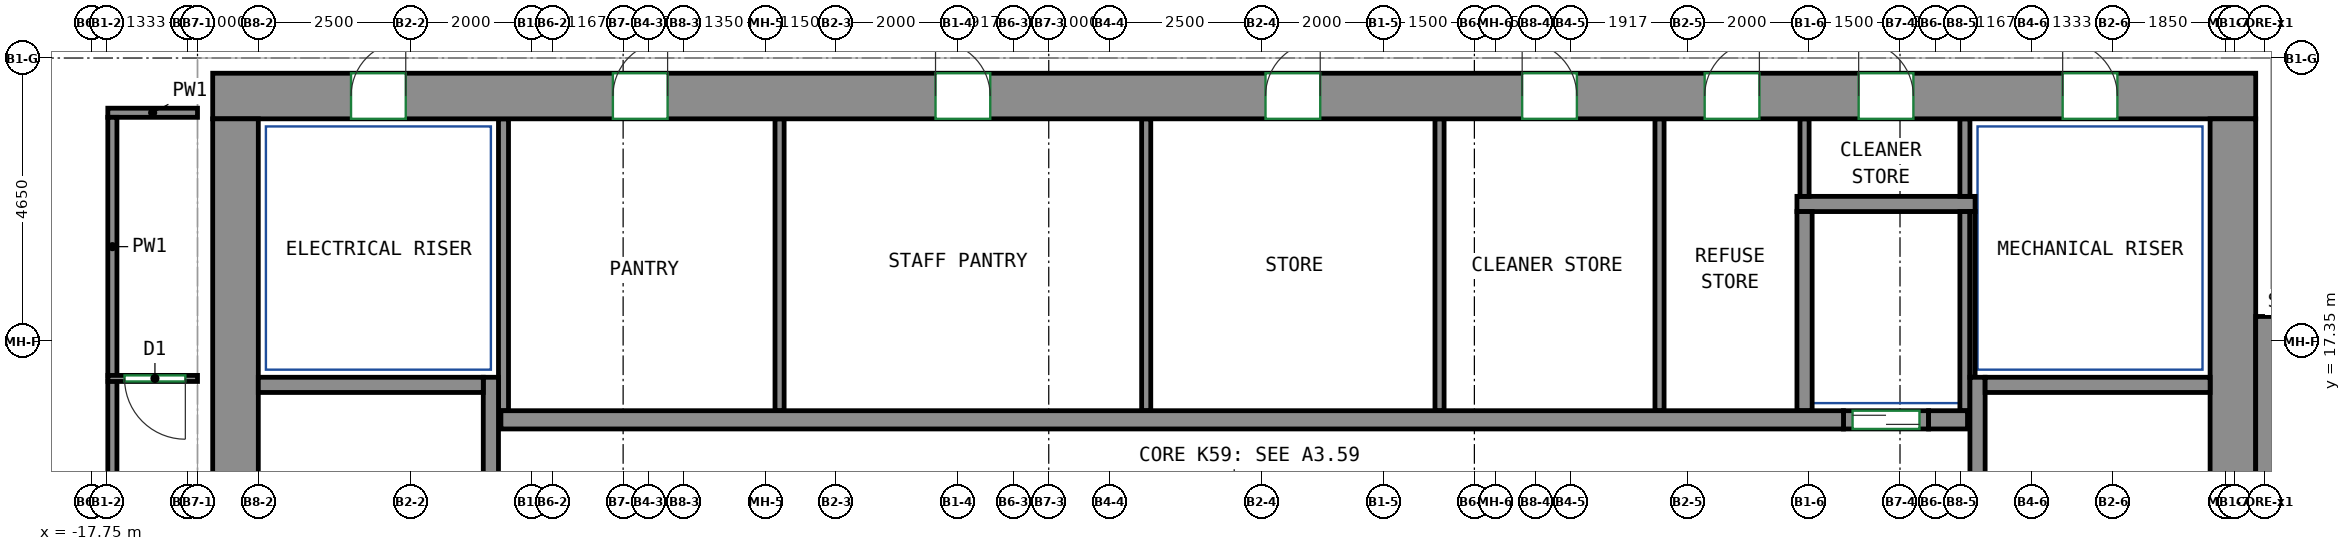
"""IFC4 building model, lengths in metres.
Left out: names, types, materials, properties, quantities, classifications, styles, units other than length and angle.
Written with IfcOpenShell. Run it as: python <this file> out.ifc"""

import sys

from ifc_helpers import new_model, si_unit, direction, frame, frame_2d, origin, place, context, subcontext, project, spatial, rectangle, extrude, source, transform, mapped, element, fill, save


model = new_model("IFC4")
c1 = context("Model", 3, precision=1e-05, world=origin(), true_north=direction((0.0, 1.0)))
c2 = subcontext(c1, "Body", "Model", "MODEL_VIEW")
j1 = project(units=[si_unit("LENGTHUNIT", "METRE"), si_unit("PLANEANGLEUNIT", "RADIAN")], contexts=[c1])
p1 = place(None, origin())
s1 = spatial("IfcSite", under=j1, at=p1, CompositionType="ELEMENT")
p2 = place(p1, origin())
s2 = spatial("IfcBuilding", under=s1, at=p2, CompositionType="ELEMENT")
p3 = place(p2, frame((0.0, 0.0, 242.4)))
s3 = spatial("IfcBuildingStorey", under=s2, at=p3, CompositionType="ELEMENT", Elevation=242.4)
m1 = source(origin(), c2, "Body", "SweptSolid", [
    extrude(rectangle(XDim=33.6, YDim=0.75, at=frame_2d((16.8, 0.0))), origin(), (0.0, 0.0, 1.0), 3.12),
])
p4 = place(p3, frame((-15.75, 21.375, 0.0), z_axis=(0.0, 0.0, 1.0), x_axis=(1.0, 0.0, 0.0)))
e1 = element("IfcWall", 1, at=p4, inside=s3, PredefinedType="SHEAR", context=c2, shape_type="MappedRepresentation", body=[
    mapped(m1, transform((0.0, 0.0, 0.0))),
])
p5 = place(p4, frame((6.581, 0.0, 0.0)))
e2 = element("IfcOpeningElement", 2, at=p5, cuts=e1, PredefinedType="OPENING", context=c2, shape_type="SweptSolid", body=[
    extrude(rectangle(XDim=0.9, YDim=2.1, at=frame_2d((0.45, 1.05))), frame((0.0, 0.385, 0.0), z_axis=(0.0, -1.0, 0.0), x_axis=(1.0, 0.0, 0.0)), (0.0, 0.0, 1.0), 0.77),
])
p6 = place(p4, frame((11.888, 0.0, 0.0)))
e3 = element("IfcOpeningElement", 3, at=p6, cuts=e1, PredefinedType="OPENING", context=c2, shape_type="SweptSolid", body=[
    extrude(rectangle(XDim=0.9, YDim=2.1, at=frame_2d((0.45, 1.05))), frame((0.0, 0.385, 0.0), z_axis=(0.0, -1.0, 0.0), x_axis=(1.0, 0.0, 0.0)), (0.0, 0.0, 1.0), 0.77),
])
p7 = place(p4, frame((17.315, 0.0, 0.0)))
e4 = element("IfcOpeningElement", 4, at=p7, cuts=e1, PredefinedType="OPENING", context=c2, shape_type="SweptSolid", body=[
    extrude(rectangle(XDim=0.9, YDim=2.1, at=frame_2d((0.45, 1.05))), frame((0.0, 0.385, 0.0), z_axis=(0.0, -1.0, 0.0), x_axis=(1.0, 0.0, 0.0)), (0.0, 0.0, 1.0), 0.77),
])
p8 = place(p4, frame((21.536, 0.0, 0.0)))
e5 = element("IfcOpeningElement", 5, at=p8, cuts=e1, PredefinedType="OPENING", context=c2, shape_type="SweptSolid", body=[
    extrude(rectangle(XDim=0.9, YDim=2.1, at=frame_2d((0.45, 1.05))), frame((0.0, 0.385, 0.0), z_axis=(0.0, -1.0, 0.0), x_axis=(1.0, 0.0, 0.0)), (0.0, 0.0, 1.0), 0.77),
])
p9 = place(p4, frame((24.537, 0.0, 0.0)))
e6 = element("IfcOpeningElement", 6, at=p9, cuts=e1, PredefinedType="OPENING", context=c2, shape_type="SweptSolid", body=[
    extrude(rectangle(XDim=0.9, YDim=2.1, at=frame_2d((0.45, 1.05))), frame((0.0, 0.385, 0.0), z_axis=(0.0, -1.0, 0.0), x_axis=(1.0, 0.0, 0.0)), (0.0, 0.0, 1.0), 0.77),
])
p10 = place(p4, frame((27.07, 0.0, 0.0)))
e7 = element("IfcOpeningElement", 7, at=p10, cuts=e1, PredefinedType="OPENING", context=c2, shape_type="SweptSolid", body=[
    extrude(rectangle(XDim=0.9, YDim=2.1, at=frame_2d((0.45, 1.05))), frame((0.0, 0.385, 0.0), z_axis=(0.0, -1.0, 0.0), x_axis=(1.0, 0.0, 0.0)), (0.0, 0.0, 1.0), 0.77),
])
p11 = place(p4, frame((2.275, 0.0, 0.0)))
e8 = element("IfcOpeningElement", 8, at=p11, cuts=e1, PredefinedType="OPENING", context=c2, shape_type="SweptSolid", body=[
    extrude(rectangle(XDim=0.9, YDim=2.1, at=frame_2d((0.45, 1.05))), frame((0.0, 0.385, 0.0), z_axis=(0.0, -1.0, 0.0), x_axis=(1.0, 0.0, 0.0)), (0.0, 0.0, 1.0), 0.77),
])
p12 = place(p4, frame((30.425, 0.0, 0.0)))
e9 = element("IfcOpeningElement", 9, at=p12, cuts=e1, PredefinedType="OPENING", context=c2, shape_type="SweptSolid", body=[
    extrude(rectangle(XDim=0.9, YDim=2.1, at=frame_2d((0.45, 1.05))), frame((0.0, 0.385, 0.0), z_axis=(0.0, -1.0, 0.0), x_axis=(1.0, 0.0, 0.0)), (0.0, 0.0, 1.0), 0.77),
])
m2 = source(origin(), c2, "Body", "SweptSolid", [
    extrude(rectangle(XDim=12.0, YDim=0.75, at=frame_2d((6.0, 0.0))), origin(), (0.0, 0.0, 1.0), 3.12),
])
for number, where, z_axis, x_axis in (
    (10, (-15.375, 9.0, 0.0), (0.0, 0.0, 1.0), (0.0, 1.0, 0.0)),
    (11, (17.475, 9.0, 0.0), (0.0, 0.0, 1.0), (0.0, 1.0, 0.0)),
):
    element("IfcWall", number, at=place(p3, frame(where, z_axis=z_axis, x_axis=x_axis)), inside=s3, PredefinedType="SHEAR", context=c2, shape_type="MappedRepresentation", body=[
        mapped(m2, transform((0.0, 0.0, 0.0))),
    ])
m3 = source(origin(), c2, "Body", "SweptSolid", [
    extrude(rectangle(XDim=7.75, YDim=0.25, at=frame_2d((3.875, 0.0))), origin(), (0.0, 0.0, 1.0), 3.12),
])
p13 = place(p3, frame((-11.175, 9.0, 0.0), z_axis=(0.0, 0.0, 1.0), x_axis=(0.0, 1.0, 0.0)))
e12 = element("IfcWall", 12, at=p13, inside=s3, PredefinedType="SHEAR", context=c2, shape_type="MappedRepresentation", body=[
    mapped(m3, transform((0.0, 0.0, 0.0))),
])
m4 = source(origin(), c2, "Body", "SweptSolid", [
    extrude(rectangle(XDim=3.7, YDim=0.25, at=frame_2d((1.85, 0.0))), origin(), (0.0, 0.0, 1.0), 3.12),
])
p14 = place(p3, frame((-15.0, 16.625, 0.0), z_axis=(0.0, 0.0, 1.0), x_axis=(1.0, 0.0, 0.0)))
e13 = element("IfcWall", 13, at=p14, inside=s3, PredefinedType="SHEAR", context=c2, shape_type="MappedRepresentation", body=[
    mapped(m4, transform((0.0, 0.0, 0.0))),
])
p15 = place(p3, frame((13.275, 9.0, 0.0), z_axis=(0.0, 0.0, 1.0), x_axis=(0.0, 1.0, 0.0)))
e14 = element("IfcWall", 14, at=p15, inside=s3, PredefinedType="SHEAR", context=c2, shape_type="MappedRepresentation", body=[
    mapped(m3, transform((0.0, 0.0, 0.0))),
])
m5 = source(origin(), c2, "Body", "SweptSolid", [
    extrude(rectangle(XDim=3.7, YDim=0.25, at=frame_2d((1.85, 0.0))), origin(), (0.0, 0.0, 1.0), 3.12),
])
p16 = place(p3, frame((13.4, 16.625, 0.0), z_axis=(0.0, 0.0, 1.0), x_axis=(1.0, 0.0, 0.0)))
e15 = element("IfcWall", 15, at=p16, inside=s3, PredefinedType="SHEAR", context=c2, shape_type="MappedRepresentation", body=[
    mapped(m5, transform((0.0, 0.0, 0.0))),
])
m6 = source(origin(), c2, "Body", "SweptSolid", [
    extrude(rectangle(XDim=8.0, YDim=0.5, at=frame_2d((4.0, 0.0))), origin(), (0.0, 0.0, 1.0), 3.12),
])
p17 = place(p3, frame((18.1, 9.75, 0.0), z_axis=(0.0, 0.0, 1.0), x_axis=(0.0, 1.0, 0.0)))
e16 = element("IfcWall", 16, at=p17, inside=s3, PredefinedType="SHEAR", context=c2, shape_type="MappedRepresentation", body=[
    mapped(m6, transform((0.0, 0.0, 0.0))),
])
m7 = source(origin(), c2, "Body", "SweptSolid", [
    extrude(rectangle(XDim=22.08, YDim=0.3, at=frame_2d((11.04, 0.0))), origin(), (0.0, 0.0, 1.0), 3.12),
])
p18 = place(p3, frame((-11.01, 16.05, 0.0), z_axis=(0.0, 0.0, 1.0), x_axis=(1.0, 0.0, 0.0)))
e17 = element("IfcWall", 17, at=p18, inside=s3, PredefinedType="SHEAR", context=c2, shape_type="MappedRepresentation", body=[
    mapped(m7, transform((0.0, 0.0, 0.0))),
])
m8 = source(origin(), c2, "Body", "SweptSolid", [
    extrude(rectangle(XDim=0.64, YDim=0.3, at=frame_2d((0.32, 0.0))), origin(), (0.0, 0.0, 1.0), 3.12),
])
p19 = place(p3, frame((12.47, 16.05, 0.0), z_axis=(0.0, 0.0, 1.0), x_axis=(1.0, 0.0, 0.0)))
e18 = element("IfcWall", 18, at=p19, inside=s3, PredefinedType="SHEAR", context=c2, shape_type="MappedRepresentation", body=[
    mapped(m8, transform((0.0, 0.0, 0.0))),
])
m9 = source(origin(), c2, "Body", "SweptSolid", [
    extrude(rectangle(XDim=1.4, YDim=0.3, at=frame_2d((0.7, 0.0))), origin(), (0.0, 0.0, 1.0), 3.12),
])
p20 = place(p3, frame((11.07, 16.05, 0.0), z_axis=(0.0, 0.0, 1.0), x_axis=(1.0, 0.0, 0.0)))
e19 = element("IfcWall", 19, at=p20, inside=s3, PredefinedType="PARTITIONING", context=c2, shape_type="MappedRepresentation", body=[
    mapped(m9, transform((0.0, 0.0, 0.0))),
])
p21 = place(p20, frame((0.15, 0.0, 0.0)))
e20 = element("IfcOpeningElement", 20, at=p21, cuts=e19, PredefinedType="OPENING", context=c2, shape_type="SweptSolid", body=[
    extrude(rectangle(XDim=1.1, YDim=2.1, at=frame_2d((0.55, 1.05))), frame((0.0, 0.16, 0.0), z_axis=(0.0, -1.0, 0.0), x_axis=(1.0, 0.0, 0.0)), (0.0, 0.0, 1.0), 0.32),
])
m10 = source(origin(), c2, "Body", "SweptSolid", [
    extrude(rectangle(XDim=2.93, YDim=0.25, at=frame_2d((1.465, 0.0))), origin(), (0.0, 0.0, 1.0), 3.12),
])
p22 = place(p3, frame((10.305, 19.6, 0.0), z_axis=(0.0, 0.0, 1.0), x_axis=(1.0, 0.0, 0.0)))
e21 = element("IfcWall", 21, at=p22, inside=s3, PredefinedType="PARTITIONING", context=c2, shape_type="MappedRepresentation", body=[
    mapped(m10, transform((0.0, 0.0, 0.0))),
])
m11 = source(origin(), c2, "Body", "SweptSolid", [
    extrude(rectangle(XDim=3.275, YDim=0.165, at=frame_2d((1.638, 0.0))), origin(), (0.0, 0.0, 1.0), 3.12),
])
p23 = place(p3, frame((13.067, 16.2, 0.0), z_axis=(0.0, 0.0, 1.0), x_axis=(0.0, 1.0, 0.0)))
e22 = element("IfcWall", 22, at=p23, inside=s3, PredefinedType="PARTITIONING", context=c2, shape_type="MappedRepresentation", body=[
    mapped(m11, transform((0.0, 0.0, 0.0))),
])
m12 = source(origin(), c2, "Body", "SweptSolid", [
    extrude(rectangle(XDim=1.275, YDim=0.165, at=frame_2d((0.637, 0.0))), origin(), (0.0, 0.0, 1.0), 3.12),
])
p24 = place(p3, frame((13.067, 19.725, 0.0), z_axis=(0.0, 0.0, 1.0), x_axis=(0.0, 1.0, 0.0)))
e23 = element("IfcWall", 23, at=p24, inside=s3, PredefinedType="PARTITIONING", context=c2, shape_type="MappedRepresentation", body=[
    mapped(m12, transform((0.0, 0.0, 0.0))),
])
m13 = source(origin(), c2, "Body", "SweptSolid", [
    extrude(rectangle(XDim=4.8, YDim=0.165, at=frame_2d((2.4, 0.0))), origin(), (0.0, 0.0, 1.0), 3.12),
])
p25 = place(p3, frame((-10.968, 16.2, 0.0), z_axis=(0.0, 0.0, 1.0), x_axis=(0.0, 1.0, 0.0)))
e24 = element("IfcWall", 24, at=p25, inside=s3, PredefinedType="PARTITIONING", context=c2, shape_type="MappedRepresentation", body=[
    mapped(m13, transform((0.0, 0.0, 0.0))),
])
m14 = source(origin(), c2, "Body", "SweptSolid", [
    extrude(rectangle(XDim=3.275, YDim=0.25, at=frame_2d((1.638, 0.0))), origin(), (0.0, 0.0, 1.0), 3.12),
])
p26 = place(p3, frame((10.43, 16.2, 0.0), z_axis=(0.0, 0.0, 1.0), x_axis=(0.0, 1.0, 0.0)))
e25 = element("IfcWall", 25, at=p26, inside=s3, PredefinedType="PARTITIONING", context=c2, shape_type="MappedRepresentation", body=[
    mapped(m14, transform((0.0, 0.0, 0.0))),
])
m15 = source(origin(), c2, "Body", "SweptSolid", [
    extrude(rectangle(XDim=2.725, YDim=0.085, at=frame_2d((1.363, 0.0))), origin(), (0.0, 0.0, 1.0), 3.12),
])
p27 = place(p3, frame((13.192, 16.75, 0.0), z_axis=(0.0, 0.0, 1.0), x_axis=(0.0, 1.0, 0.0)))
e26 = element("IfcWall", 26, at=p27, inside=s3, PredefinedType="PARTITIONING", context=c2, shape_type="MappedRepresentation", body=[
    mapped(m15, transform((0.0, 0.0, 0.0))),
])
m16 = source(origin(), c2, "Body", "SweptSolid", [
    extrude(rectangle(XDim=4.8, YDim=0.15, at=frame_2d((2.4, 0.0))), origin(), (0.0, 0.0, 1.0), 3.12),
])
for number, where, z_axis, x_axis in (
    (27, (-6.427, 16.2, 0.0), (0.0, 0.0, 1.0), (0.0, 1.0, 0.0)),
    (28, (-0.397, 16.2, 0.0), (0.0, 0.0, 1.0), (0.0, 1.0, 0.0)),
    (29, (4.427, 16.2, 0.0), (0.0, 0.0, 1.0), (0.0, 1.0, 0.0)),
    (30, (8.045, 16.2, 0.0), (0.0, 0.0, 1.0), (0.0, 1.0, 0.0)),
):
    element("IfcWall", number, at=place(p3, frame(where, z_axis=z_axis, x_axis=x_axis)), inside=s3, PredefinedType="PARTITIONING", context=c2, shape_type="MappedRepresentation", body=[
        mapped(m16, transform((0.0, 0.0, 0.0))),
    ])
m17 = source(origin(), c2, "Body", "SweptSolid", [
    extrude(rectangle(XDim=1.275, YDim=0.15, at=frame_2d((0.637, 0.0))), origin(), (0.0, 0.0, 1.0), 3.12),
])
p28 = place(p3, frame((10.43, 19.725, 0.0), z_axis=(0.0, 0.0, 1.0), x_axis=(0.0, 1.0, 0.0)))
e31 = element("IfcWall", 31, at=p28, inside=s3, PredefinedType="PARTITIONING", context=c2, shape_type="MappedRepresentation", body=[
    mapped(m17, transform((0.0, 0.0, 0.0))),
])
p29 = place(p3, frame((-17.4, 4.214, 0.0), z_axis=(0.0, 0.0, 1.0), x_axis=(0.0, 1.0, 0.0)))
e32 = element("IfcWall", 32, at=p29, inside=s3, PredefinedType="PARTITIONING", context=c2, shape_type="SweptSolid", body=[
    extrude(rectangle(XDim=12.477, YDim=0.15, at=frame_2d((6.238, 0.0))), origin(), (0.0, 0.0, 1.0), 3.12),
])
p30 = place(p3, frame((-17.475, 21.1, 0.0), z_axis=(0.0, 0.0, 1.0), x_axis=(1.0, 0.0, 0.0)))
e33 = element("IfcWall", 33, at=p30, inside=s3, PredefinedType="PARTITIONING", context=c2, shape_type="SweptSolid", body=[
    extrude(rectangle(XDim=1.475, YDim=0.15, at=frame_2d((0.738, 0.0))), origin(), (0.0, 0.0, 1.0), 3.12),
])
p31 = place(p3, frame((-17.4, 16.771, 0.0), z_axis=(0.0, 0.0, 1.0), x_axis=(0.0, 1.0, 0.0)))
e34 = element("IfcWall", 34, at=p31, inside=s3, PredefinedType="PARTITIONING", context=c2, shape_type="SweptSolid", body=[
    extrude(rectangle(XDim=4.254, YDim=0.15, at=frame_2d((2.127, 0.0))), origin(), (0.0, 0.0, 1.0), 3.12),
])
p32 = place(p3, frame((-16.0, 16.731, 0.0), z_axis=(0.0, 0.0, 1.0), x_axis=(-1.0, 0.0, 0.0)))
e35 = element("IfcWall", 35, at=p32, inside=s3, PredefinedType="PARTITIONING", context=c2, shape_type="SweptSolid", body=[
    extrude(rectangle(XDim=1.473, YDim=0.1, at=frame_2d((0.736, 0.0))), origin(), (0.0, 0.0, 1.0), 3.12),
])
p33 = place(p32, frame((0.2, 0.0, 0.0)))
e36 = element("IfcOpeningElement", 36, at=p33, cuts=e35, PredefinedType="OPENING", context=c2, shape_type="SweptSolid", body=[
    extrude(rectangle(XDim=1.0, YDim=2.1, at=frame_2d((0.5, 1.05))), frame((0.0, 0.06, 0.0), z_axis=(0.0, -1.0, 0.0), x_axis=(1.0, 0.0, 0.0)), (0.0, 0.0, 1.0), 0.12),
])
p34 = place(p21, origin())
e37 = element("IfcDoor", 37, at=p34, inside=s3, OperationType="DOUBLE_DOOR_SLIDING", PredefinedType="DOOR", context=c2, shape_type="SweptSolid", body=[
    extrude(rectangle(XDim=1.1, YDim=2.1, at=frame_2d((0.55, 1.05))), frame((0.0, 0.025, 0.0), z_axis=(0.0, -1.0, 0.0), x_axis=(1.0, 0.0, 0.0)), (0.0, 0.0, 1.0), 0.05),
])
fill(e20, e37)
p35 = place(p5, origin())
e38 = element("IfcDoor", 38, at=p35, inside=s3, OperationType="SINGLE_SWING_RIGHT", PredefinedType="DOOR", context=c2, shape_type="SweptSolid", body=[
    extrude(rectangle(XDim=0.9, YDim=2.1, at=frame_2d((0.45, 1.05))), frame((0.0, -0.23, 0.0), z_axis=(0.0, -1.0, 0.0), x_axis=(1.0, 0.0, 0.0)), (0.0, 0.0, 1.0), 0.05),
])
fill(e2, e38)
p36 = place(p6, origin())
e39 = element("IfcDoor", 39, at=p36, inside=s3, OperationType="SINGLE_SWING_LEFT", PredefinedType="DOOR", context=c2, shape_type="SweptSolid", body=[
    extrude(rectangle(XDim=0.9, YDim=2.1, at=frame_2d((0.45, 1.05))), frame((0.0, -0.23, 0.0), z_axis=(0.0, -1.0, 0.0), x_axis=(1.0, 0.0, 0.0)), (0.0, 0.0, 1.0), 0.05),
])
fill(e3, e39)
p37 = place(p7, origin())
e40 = element("IfcDoor", 40, at=p37, inside=s3, OperationType="SINGLE_SWING_RIGHT", PredefinedType="DOOR", context=c2, shape_type="SweptSolid", body=[
    extrude(rectangle(XDim=0.9, YDim=2.1, at=frame_2d((0.45, 1.05))), frame((0.0, -0.23, 0.0), z_axis=(0.0, -1.0, 0.0), x_axis=(1.0, 0.0, 0.0)), (0.0, 0.0, 1.0), 0.05),
])
fill(e4, e40)
p38 = place(p8, origin())
e41 = element("IfcDoor", 41, at=p38, inside=s3, OperationType="SINGLE_SWING_LEFT", PredefinedType="DOOR", context=c2, shape_type="SweptSolid", body=[
    extrude(rectangle(XDim=0.9, YDim=2.1, at=frame_2d((0.45, 1.05))), frame((0.0, -0.23, 0.0), z_axis=(0.0, -1.0, 0.0), x_axis=(1.0, 0.0, 0.0)), (0.0, 0.0, 1.0), 0.05),
])
fill(e5, e41)
p39 = place(p9, origin())
e42 = element("IfcDoor", 42, at=p39, inside=s3, OperationType="SINGLE_SWING_RIGHT", PredefinedType="DOOR", context=c2, shape_type="SweptSolid", body=[
    extrude(rectangle(XDim=0.9, YDim=2.1, at=frame_2d((0.45, 1.05))), frame((0.0, -0.23, 0.0), z_axis=(0.0, -1.0, 0.0), x_axis=(1.0, 0.0, 0.0)), (0.0, 0.0, 1.0), 0.05),
])
fill(e6, e42)
p40 = place(p10, origin())
e43 = element("IfcDoor", 43, at=p40, inside=s3, OperationType="SINGLE_SWING_LEFT", PredefinedType="DOOR", context=c2, shape_type="SweptSolid", body=[
    extrude(rectangle(XDim=0.9, YDim=2.1, at=frame_2d((0.45, 1.05))), frame((0.0, -0.23, 0.0), z_axis=(0.0, -1.0, 0.0), x_axis=(1.0, 0.0, 0.0)), (0.0, 0.0, 1.0), 0.05),
])
fill(e7, e43)
p41 = place(p11, origin())
e44 = element("IfcDoor", 44, at=p41, inside=s3, OperationType="SINGLE_SWING_RIGHT", PredefinedType="DOOR", context=c2, shape_type="SweptSolid", body=[
    extrude(rectangle(XDim=0.9, YDim=2.1, at=frame_2d((0.45, 1.05))), frame((0.0, -0.23, 0.0), z_axis=(0.0, -1.0, 0.0), x_axis=(1.0, 0.0, 0.0)), (0.0, 0.0, 1.0), 0.05),
])
fill(e8, e44)
p42 = place(p12, origin())
e45 = element("IfcDoor", 45, at=p42, inside=s3, OperationType="SINGLE_SWING_LEFT", PredefinedType="DOOR", context=c2, shape_type="SweptSolid", body=[
    extrude(rectangle(XDim=0.9, YDim=2.1, at=frame_2d((0.45, 1.05))), frame((0.0, -0.23, 0.0), z_axis=(0.0, -1.0, 0.0), x_axis=(1.0, 0.0, 0.0)), (0.0, 0.0, 1.0), 0.05),
])
fill(e9, e45)
p43 = place(p33, origin())
e46 = element("IfcDoor", 46, at=p43, inside=s3, OperationType="SINGLE_SWING_LEFT", PredefinedType="DOOR", context=c2, shape_type="SweptSolid", body=[
    extrude(rectangle(XDim=1.0, YDim=2.1, at=frame_2d((0.5, 1.05))), frame((0.0, 0.025, 0.0), z_axis=(0.0, -1.0, 0.0), x_axis=(1.0, 0.0, 0.0)), (0.0, 0.0, 1.0), 0.05),
])
fill(e36, e46)
save(model, sys.argv[1])
